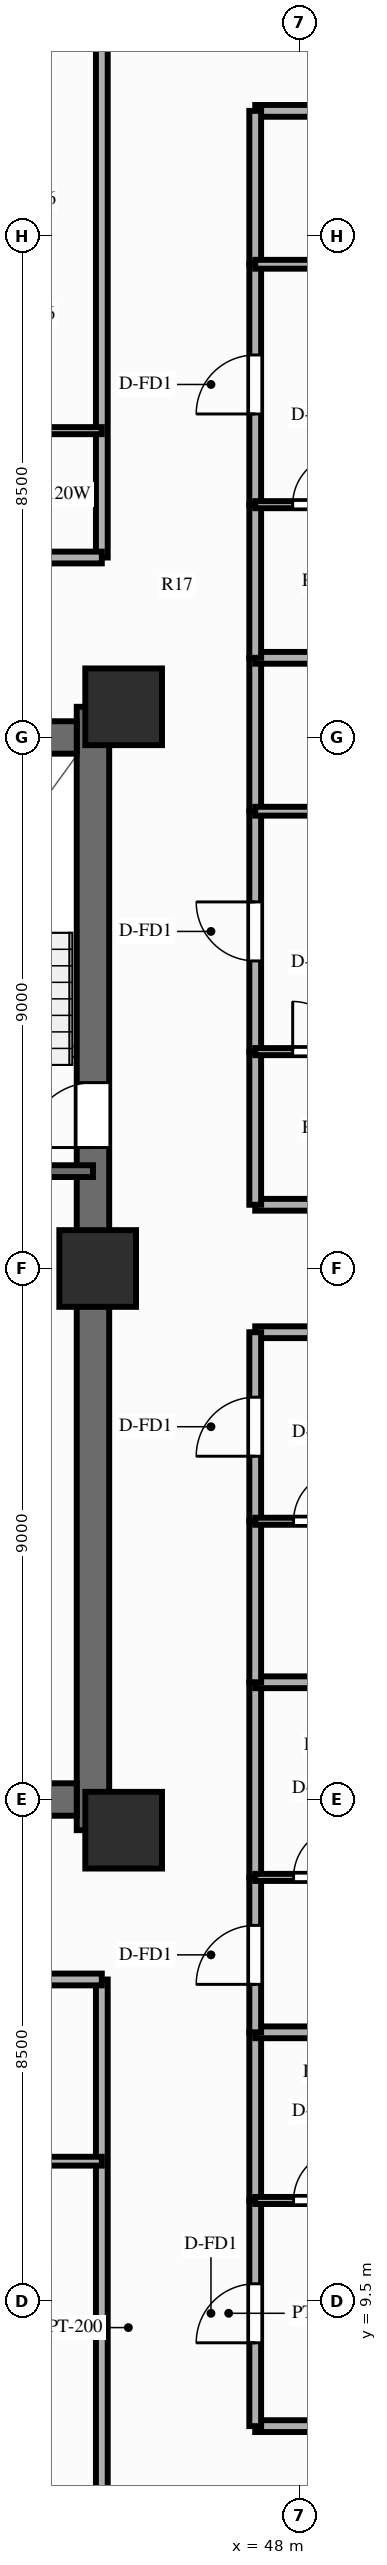
"""IFC4 building model, lengths in metres.
Left out: names, types, materials, properties, quantities, classifications, styles, units other than length and angle.
Written with IfcOpenShell. Run it as: python <this file> out.ifc"""

import sys

from ifc_helpers import new_model, si_unit, direction, frame, frame_2d, origin, origin_2d, place, context, subcontext, project, spatial, rectangle, extrude, source, transform, mapped, element, fill, save


model = new_model("IFC4")
c1 = context("Model", 3, precision=1e-05, world=origin(), true_north=direction((0.0, 1.0)))
c2 = subcontext(c1, "Body", "Model", "MODEL_VIEW")
j1 = project(units=[si_unit("LENGTHUNIT", "METRE"), si_unit("PLANEANGLEUNIT", "RADIAN")], contexts=[c1])
p1 = place(None, origin())
s1 = spatial("IfcSite", under=j1, at=p1, CompositionType="ELEMENT")
p2 = place(p1, origin())
s2 = spatial("IfcBuilding", under=s1, at=p2, CompositionType="ELEMENT")
p3 = place(p2, frame((0.0, 0.0, 116.85)))
s3 = spatial("IfcBuildingStorey", under=s2, at=p3, CompositionType="ELEMENT", Elevation=116.85)
p4 = place(p3, frame((44.5, 17.48, 0.0), z_axis=(0.0, 0.0, 1.0), x_axis=(0.0, 1.0, 0.0)))
e1 = element("IfcWall", 1, at=p4, inside=s3, PredefinedType="SHEAR", context=c2, shape_type="SweptSolid", body=[
    extrude(rectangle(XDim=19.04, YDim=0.55, at=frame_2d((9.52, 0.0))), origin(), (0.0, 0.0, 1.0), 3.0),
])
p5 = place(p4, frame((12.67, 0.0, 0.0), z_axis=(0.0, 0.0, 1.0), x_axis=(-1.0, 0.0, 0.0)))
e2 = element("IfcOpeningElement", 2, at=p5, cuts=e1, PredefinedType="OPENING", context=c2, shape_type="SweptSolid", body=[
    extrude(rectangle(XDim=1.1, YDim=2.15, at=frame_2d((0.55, 1.075))), frame((0.0, 0.287, 0.0), z_axis=(0.0, -1.0, 0.0), x_axis=(1.0, 0.0, 0.0)), (0.0, 0.0, 1.0), 0.574),
])
p6 = place(p3, frame((31.775, 18.0, 0.0), z_axis=(0.0, 0.0, 1.0), x_axis=(1.0, 0.0, 0.0)))
e3 = element("IfcWall", 3, at=p6, inside=s3, PredefinedType="SHEAR", context=c2, shape_type="SweptSolid", body=[
    extrude(rectangle(XDim=12.45, YDim=0.55, at=frame_2d((6.225, 0.0))), origin(), (0.0, 0.0, 1.0), 3.0),
])
p7 = place(p3, frame((31.775, 36.0, 0.0), z_axis=(0.0, 0.0, 1.0), x_axis=(1.0, 0.0, 0.0)))
e4 = element("IfcWall", 4, at=p7, inside=s3, PredefinedType="SHEAR", context=c2, shape_type="SweptSolid", body=[
    extrude(rectangle(XDim=12.45, YDim=0.55, at=frame_2d((6.225, 0.0))), origin(), (0.0, 0.0, 1.0), 3.0),
])
p8 = place(p7, frame((5.175, 0.0, 0.0), z_axis=(0.0, 0.0, 1.0), x_axis=(-1.0, 0.0, 0.0)))
e5 = element("IfcOpeningElement", 5, at=p8, cuts=e4, PredefinedType="OPENING", context=c2, shape_type="SweptSolid", body=[
    extrude(rectangle(XDim=1.4, YDim=2.15, at=frame_2d((0.7, 1.075))), frame((0.0, 0.287, 0.0), z_axis=(0.0, -1.0, 0.0), x_axis=(1.0, 0.0, 0.0)), (0.0, 0.0, 1.0), 0.574),
])
m1 = source(origin(), c2, "Body", "SweptSolid", [
    extrude(rectangle(XDim=1.3, YDim=1.3, at=origin_2d()), origin(), (0.0, 0.0, 1.0), 3.0),
])
for number, where, z_axis, x_axis in (
    (6, (45.02, 17.48, 0.0), (0.0, 0.0, 1.0), (1.0, 0.0, 0.0)),
    (7, (45.02, 36.52, 0.0), (0.0, 0.0, 1.0), (1.0, 0.0, 0.0)),
    (8, (44.58, 27.0, 0.0), (0.0, 0.0, 1.0), (1.0, 0.0, 0.0)),
):
    element("IfcColumn", number, at=place(p3, frame(where, z_axis=z_axis, x_axis=x_axis)), inside=s3, PredefinedType="COLUMN", context=c2, shape_type="MappedRepresentation", body=[
        mapped(m1, transform((0.0, 0.0, 0.0), scale=1.0)),
    ])
p9 = place(p3, frame((40.57, 28.65, 0.0), z_axis=(0.0, 0.0, 1.0), x_axis=(1.0, 0.0, 0.0)))
e9 = element("IfcWall", 9, at=p9, inside=s3, PredefinedType="SOLIDWALL", context=c2, shape_type="SweptSolid", body=[
    extrude(rectangle(XDim=3.93, YDim=0.2, at=frame_2d((1.965, 0.0))), origin(), (0.0, 0.0, 1.0), 2.79),
])
p10 = place(p3, frame((44.65, 14.95, 0.0), z_axis=(0.0, 0.0, 1.0), x_axis=(0.0, -1.0, 0.0)))
e10 = element("IfcWall", 10, at=p10, inside=s3, PredefinedType="PARTITIONING", context=c2, shape_type="SweptSolid", body=[
    extrude(rectangle(XDim=11.8, YDim=0.2, at=frame_2d((5.9, 0.0))), origin(), (0.0, 0.0, 1.0), 2.34),
])
p11 = place(p3, frame((40.923, 14.95, 0.0), z_axis=(0.0, 0.0, 1.0), x_axis=(1.0, 0.0, 0.0)))
e11 = element("IfcWall", 11, at=p11, inside=s3, PredefinedType="PARTITIONING", context=c2, shape_type="SweptSolid", body=[
    extrude(rectangle(XDim=3.727, YDim=0.2, at=frame_2d((1.864, 0.0))), origin(), (0.0, 0.0, 1.0), 2.79),
])
p12 = place(p3, frame((40.923, 11.87, 0.0), z_axis=(0.0, 0.0, 1.0), x_axis=(1.0, 0.0, 0.0)))
e12 = element("IfcWall", 12, at=p12, inside=s3, PredefinedType="PARTITIONING", context=c2, shape_type="SweptSolid", body=[
    extrude(rectangle(XDim=3.727, YDim=0.15, at=frame_2d((1.864, 0.0))), origin(), (0.0, 0.0, 1.0), 2.79),
])
p13 = place(p3, frame((44.65, 39.05, 0.0), z_axis=(0.0, 0.0, 1.0), x_axis=(0.0, 1.0, 0.0)))
e13 = element("IfcWall", 13, at=p13, inside=s3, PredefinedType="PARTITIONING", context=c2, shape_type="SweptSolid", body=[
    extrude(rectangle(XDim=11.8, YDim=0.2, at=frame_2d((5.9, 0.0))), origin(), (0.0, 0.0, 1.0), 2.34),
])
p14 = place(p3, frame((42.55, 39.05, 0.0), z_axis=(0.0, 0.0, 1.0), x_axis=(1.0, 0.0, 0.0)))
e14 = element("IfcWall", 14, at=p14, inside=s3, PredefinedType="PARTITIONING", context=c2, shape_type="SweptSolid", body=[
    extrude(rectangle(XDim=2.1, YDim=0.2, at=frame_2d((1.05, 0.0))), origin(), (0.0, 0.0, 1.0), 2.79),
])
p15 = place(p3, frame((42.55, 41.2, 0.0), z_axis=(0.0, 0.0, 1.0), x_axis=(1.0, 0.0, 0.0)))
e15 = element("IfcWall", 15, at=p15, inside=s3, PredefinedType="PARTITIONING", context=c2, shape_type="SweptSolid", body=[
    extrude(rectangle(XDim=2.1, YDim=0.12, at=frame_2d((1.05, 0.0))), origin(), (0.0, 0.0, 1.0), 2.79),
])
for number, where, z_axis, x_axis in (
    (16, (47.25, 7.38, 0.0), (0.0, 0.0, 1.0), (1.0, 0.0, 0.0)),
    (17, (47.25, 25.92, 0.0), (0.0, 0.0, 1.0), (1.0, 0.0, 0.0)),
):
    element("IfcWall", number, at=place(p3, frame(where, z_axis=z_axis, x_axis=x_axis)), inside=s3, PredefinedType="PARTITIONING", context=c2, shape_type="SweptSolid", body=[
        extrude(rectangle(XDim=16.6, YDim=0.2, at=frame_2d((8.3, 0.0))), origin(), (0.0, 0.0, 1.0), 2.79),
    ])
p16 = place(p3, frame((47.25, 7.38, 0.0), z_axis=(0.0, 0.0, 1.0), x_axis=(0.0, 1.0, 0.0)))
e18 = element("IfcWall", 18, at=p16, inside=s3, PredefinedType="PARTITIONING", context=c2, shape_type="SweptSolid", body=[
    extrude(rectangle(XDim=3.824, YDim=0.2, at=frame_2d((1.912, 0.0))), origin(), (0.0, 0.0, 1.0), 2.79),
])
p17 = place(p16, frame((1.412, 0.0, 0.0)))
e19 = element("IfcOpeningElement", 19, at=p17, cuts=e18, PredefinedType="OPENING", context=c2, shape_type="SweptSolid", body=[
    extrude(rectangle(XDim=1.0, YDim=2.15, at=frame_2d((0.5, 1.075))), frame((0.0, 0.112, 0.0), z_axis=(0.0, -1.0, 0.0), x_axis=(1.0, 0.0, 0.0)), (0.0, 0.0, 1.0), 0.224),
])
p18 = place(p3, frame((47.25, 11.204, 0.0), z_axis=(0.0, 0.0, 1.0), x_axis=(0.0, 1.0, 0.0)))
e20 = element("IfcWall", 20, at=p18, inside=s3, PredefinedType="PARTITIONING", context=c2, shape_type="SweptSolid", body=[
    extrude(rectangle(XDim=2.85, YDim=0.2, at=frame_2d((1.425, 0.0))), origin(), (0.0, 0.0, 1.0), 2.79),
])
p19 = place(p3, frame((47.25, 11.204, 0.0), z_axis=(0.0, 0.0, 1.0), x_axis=(1.0, 0.0, 0.0)))
e21 = element("IfcWall", 21, at=p19, inside=s3, PredefinedType="PARTITIONING", context=c2, shape_type="SweptSolid", body=[
    extrude(rectangle(XDim=2.15, YDim=0.12, at=frame_2d((1.075, 0.0))), origin(), (0.0, 0.0, 1.0), 2.79),
])
p20 = place(p19, frame((0.65, 0.0, 0.0)))
e22 = element("IfcOpeningElement", 22, at=p20, cuts=e21, PredefinedType="OPENING", context=c2, shape_type="SweptSolid", body=[
    extrude(rectangle(XDim=0.85, YDim=2.05, at=frame_2d((0.425, 1.025))), frame((0.0, 0.072, 0.0), z_axis=(0.0, -1.0, 0.0), x_axis=(1.0, 0.0, 0.0)), (0.0, 0.0, 1.0), 0.144),
])
p21 = place(p3, frame((47.25, 14.054, 0.0), z_axis=(0.0, 0.0, 1.0), x_axis=(1.0, 0.0, 0.0)))
e23 = element("IfcWall", 23, at=p21, inside=s3, PredefinedType="PARTITIONING", context=c2, shape_type="SweptSolid", body=[
    extrude(rectangle(XDim=16.6, YDim=0.2, at=frame_2d((8.3, 0.0))), origin(), (0.0, 0.0, 1.0), 2.79),
])
p22 = place(p3, frame((47.25, 14.054, 0.0), z_axis=(0.0, 0.0, 1.0), x_axis=(0.0, 1.0, 0.0)))
e24 = element("IfcWall", 24, at=p22, inside=s3, PredefinedType="PARTITIONING", context=c2, shape_type="SweptSolid", body=[
    extrude(rectangle(XDim=2.625, YDim=0.2, at=frame_2d((1.313, 0.0))), origin(), (0.0, 0.0, 1.0), 2.79),
])
p23 = place(p22, frame((0.813, 0.0, 0.0)))
e25 = element("IfcOpeningElement", 25, at=p23, cuts=e24, PredefinedType="OPENING", context=c2, shape_type="SweptSolid", body=[
    extrude(rectangle(XDim=1.0, YDim=2.15, at=frame_2d((0.5, 1.075))), frame((0.0, 0.112, 0.0), z_axis=(0.0, -1.0, 0.0), x_axis=(1.0, 0.0, 0.0)), (0.0, 0.0, 1.0), 0.224),
])
p24 = place(p3, frame((47.25, 16.68, 0.0), z_axis=(0.0, 0.0, 1.0), x_axis=(0.0, 1.0, 0.0)))
e26 = element("IfcWall", 26, at=p24, inside=s3, PredefinedType="PARTITIONING", context=c2, shape_type="SweptSolid", body=[
    extrude(rectangle(XDim=3.307, YDim=0.2, at=frame_2d((1.654, 0.0))), origin(), (0.0, 0.0, 1.0), 2.79),
])
p25 = place(p3, frame((47.25, 16.68, 0.0), z_axis=(0.0, 0.0, 1.0), x_axis=(1.0, 0.0, 0.0)))
e27 = element("IfcWall", 27, at=p25, inside=s3, PredefinedType="PARTITIONING", context=c2, shape_type="SweptSolid", body=[
    extrude(rectangle(XDim=2.15, YDim=0.12, at=frame_2d((1.075, 0.0))), origin(), (0.0, 0.0, 1.0), 2.79),
])
p26 = place(p25, frame((0.65, 0.0, 0.0)))
e28 = element("IfcOpeningElement", 28, at=p26, cuts=e27, PredefinedType="OPENING", context=c2, shape_type="SweptSolid", body=[
    extrude(rectangle(XDim=0.85, YDim=2.05, at=frame_2d((0.425, 1.025))), frame((0.0, 0.072, 0.0), z_axis=(0.0, -1.0, 0.0), x_axis=(1.0, 0.0, 0.0)), (0.0, 0.0, 1.0), 0.144),
])
p27 = place(p3, frame((47.25, 19.987, 0.0), z_axis=(0.0, 0.0, 1.0), x_axis=(1.0, 0.0, 0.0)))
e29 = element("IfcWall", 29, at=p27, inside=s3, PredefinedType="PARTITIONING", context=c2, shape_type="SweptSolid", body=[
    extrude(rectangle(XDim=16.6, YDim=0.2, at=frame_2d((8.3, 0.0))), origin(), (0.0, 0.0, 1.0), 2.79),
])
p28 = place(p3, frame((47.25, 19.987, 0.0), z_axis=(0.0, 0.0, 1.0), x_axis=(0.0, 1.0, 0.0)))
e30 = element("IfcWall", 30, at=p28, inside=s3, PredefinedType="PARTITIONING", context=c2, shape_type="SweptSolid", body=[
    extrude(rectangle(XDim=2.729, YDim=0.2, at=frame_2d((1.365, 0.0))), origin(), (0.0, 0.0, 1.0), 2.79),
])
p29 = place(p3, frame((47.25, 22.716, 0.0), z_axis=(0.0, 0.0, 1.0), x_axis=(0.0, 1.0, 0.0)))
e31 = element("IfcWall", 31, at=p29, inside=s3, PredefinedType="PARTITIONING", context=c2, shape_type="SweptSolid", body=[
    extrude(rectangle(XDim=3.204, YDim=0.2, at=frame_2d((1.602, 0.0))), origin(), (0.0, 0.0, 1.0), 2.79),
])
p30 = place(p29, frame((1.102, 0.0, 0.0)))
e32 = element("IfcOpeningElement", 32, at=p30, cuts=e31, PredefinedType="OPENING", context=c2, shape_type="SweptSolid", body=[
    extrude(rectangle(XDim=1.0, YDim=2.15, at=frame_2d((0.5, 1.075))), frame((0.0, 0.112, 0.0), z_axis=(0.0, -1.0, 0.0), x_axis=(1.0, 0.0, 0.0)), (0.0, 0.0, 1.0), 0.224),
])
p31 = place(p3, frame((47.25, 22.716, 0.0), z_axis=(0.0, 0.0, 1.0), x_axis=(1.0, 0.0, 0.0)))
e33 = element("IfcWall", 33, at=p31, inside=s3, PredefinedType="PARTITIONING", context=c2, shape_type="SweptSolid", body=[
    extrude(rectangle(XDim=2.15, YDim=0.12, at=frame_2d((1.075, 0.0))), origin(), (0.0, 0.0, 1.0), 2.79),
])
p32 = place(p31, frame((0.65, 0.0, 0.0)))
e34 = element("IfcOpeningElement", 34, at=p32, cuts=e33, PredefinedType="OPENING", context=c2, shape_type="SweptSolid", body=[
    extrude(rectangle(XDim=0.85, YDim=2.05, at=frame_2d((0.425, 1.025))), frame((0.0, 0.072, 0.0), z_axis=(0.0, -1.0, 0.0), x_axis=(1.0, 0.0, 0.0)), (0.0, 0.0, 1.0), 0.144),
])
for number, where, z_axis, x_axis in (
    (35, (47.25, 28.08, 0.0), (0.0, 0.0, 1.0), (1.0, 0.0, 0.0)),
    (36, (47.25, 46.62, 0.0), (0.0, 0.0, 1.0), (1.0, 0.0, 0.0)),
):
    element("IfcWall", number, at=place(p3, frame(where, z_axis=z_axis, x_axis=x_axis)), inside=s3, PredefinedType="PARTITIONING", context=c2, shape_type="SweptSolid", body=[
        extrude(rectangle(XDim=16.6, YDim=0.2, at=frame_2d((8.3, 0.0))), origin(), (0.0, 0.0, 1.0), 2.79),
    ])
p33 = place(p3, frame((47.25, 28.08, 0.0), z_axis=(0.0, 0.0, 1.0), x_axis=(0.0, 1.0, 0.0)))
e37 = element("IfcWall", 37, at=p33, inside=s3, PredefinedType="PARTITIONING", context=c2, shape_type="SweptSolid", body=[
    extrude(rectangle(XDim=2.595, YDim=0.2, at=frame_2d((1.298, 0.0))), origin(), (0.0, 0.0, 1.0), 2.79),
])
p34 = place(p3, frame((47.25, 30.676, 0.0), z_axis=(0.0, 0.0, 1.0), x_axis=(0.0, 1.0, 0.0)))
e38 = element("IfcWall", 38, at=p34, inside=s3, PredefinedType="PARTITIONING", context=c2, shape_type="SweptSolid", body=[
    extrude(rectangle(XDim=4.074, YDim=0.2, at=frame_2d((2.037, 0.0))), origin(), (0.0, 0.0, 1.0), 2.79),
])
p35 = place(p34, frame((1.537, 0.0, 0.0)))
e39 = element("IfcOpeningElement", 39, at=p35, cuts=e38, PredefinedType="OPENING", context=c2, shape_type="SweptSolid", body=[
    extrude(rectangle(XDim=1.0, YDim=2.15, at=frame_2d((0.5, 1.075))), frame((0.0, 0.112, 0.0), z_axis=(0.0, -1.0, 0.0), x_axis=(1.0, 0.0, 0.0)), (0.0, 0.0, 1.0), 0.224),
])
p36 = place(p3, frame((47.25, 34.75, 0.0), z_axis=(0.0, 0.0, 1.0), x_axis=(0.0, 1.0, 0.0)))
e40 = element("IfcWall", 40, at=p36, inside=s3, PredefinedType="PARTITIONING", context=c2, shape_type="SweptSolid", body=[
    extrude(rectangle(XDim=2.6, YDim=0.2, at=frame_2d((1.3, 0.0))), origin(), (0.0, 0.0, 1.0), 2.79),
])
p37 = place(p3, frame((47.25, 30.676, 0.0), z_axis=(0.0, 0.0, 1.0), x_axis=(1.0, 0.0, 0.0)))
e41 = element("IfcWall", 41, at=p37, inside=s3, PredefinedType="PARTITIONING", context=c2, shape_type="SweptSolid", body=[
    extrude(rectangle(XDim=2.12, YDim=0.12, at=frame_2d((1.06, 0.0))), origin(), (0.0, 0.0, 1.0), 2.79),
])
p38 = place(p37, frame((0.635, 0.0, 0.0)))
e42 = element("IfcOpeningElement", 42, at=p38, cuts=e41, PredefinedType="OPENING", context=c2, shape_type="SweptSolid", body=[
    extrude(rectangle(XDim=0.85, YDim=2.05, at=frame_2d((0.425, 1.025))), frame((0.0, 0.072, 0.0), z_axis=(0.0, -1.0, 0.0), x_axis=(1.0, 0.0, 0.0)), (0.0, 0.0, 1.0), 0.144),
])
p39 = place(p3, frame((47.25, 34.75, 0.0), z_axis=(0.0, 0.0, 1.0), x_axis=(1.0, 0.0, 0.0)))
e43 = element("IfcWall", 43, at=p39, inside=s3, PredefinedType="PARTITIONING", context=c2, shape_type="SweptSolid", body=[
    extrude(rectangle(XDim=3.08, YDim=0.15, at=frame_2d((1.54, 0.0))), origin(), (0.0, 0.0, 1.0), 2.79),
])
p40 = place(p39, frame((1.09, 0.0, 0.0)))
e44 = element("IfcOpeningElement", 44, at=p40, cuts=e43, PredefinedType="OPENING", context=c2, shape_type="SweptSolid", body=[
    extrude(rectangle(XDim=0.9, YDim=2.1, at=frame_2d((0.45, 1.05))), frame((0.0, 0.087, 0.0), z_axis=(0.0, -1.0, 0.0), x_axis=(1.0, 0.0, 0.0)), (0.0, 0.0, 1.0), 0.174),
])
p41 = place(p3, frame((47.25, 37.35, 0.0), z_axis=(0.0, 0.0, 1.0), x_axis=(1.0, 0.0, 0.0)))
e45 = element("IfcWall", 45, at=p41, inside=s3, PredefinedType="PARTITIONING", context=c2, shape_type="SweptSolid", body=[
    extrude(rectangle(XDim=16.6, YDim=0.2, at=frame_2d((8.3, 0.0))), origin(), (0.0, 0.0, 1.0), 2.79),
])
p42 = place(p3, frame((47.25, 37.35, 0.0), z_axis=(0.0, 0.0, 1.0), x_axis=(0.0, 1.0, 0.0)))
e46 = element("IfcWall", 46, at=p42, inside=s3, PredefinedType="PARTITIONING", context=c2, shape_type="SweptSolid", body=[
    extrude(rectangle(XDim=2.595, YDim=0.2, at=frame_2d((1.298, 0.0))), origin(), (0.0, 0.0, 1.0), 2.79),
])
p43 = place(p3, frame((47.25, 39.946, 0.0), z_axis=(0.0, 0.0, 1.0), x_axis=(0.0, 1.0, 0.0)))
e47 = element("IfcWall", 47, at=p43, inside=s3, PredefinedType="PARTITIONING", context=c2, shape_type="SweptSolid", body=[
    extrude(rectangle(XDim=4.074, YDim=0.2, at=frame_2d((2.037, 0.0))), origin(), (0.0, 0.0, 1.0), 2.79),
])
p44 = place(p43, frame((1.537, 0.0, 0.0)))
e48 = element("IfcOpeningElement", 48, at=p44, cuts=e47, PredefinedType="OPENING", context=c2, shape_type="SweptSolid", body=[
    extrude(rectangle(XDim=1.0, YDim=2.15, at=frame_2d((0.5, 1.075))), frame((0.0, 0.112, 0.0), z_axis=(0.0, -1.0, 0.0), x_axis=(1.0, 0.0, 0.0)), (0.0, 0.0, 1.0), 0.224),
])
p45 = place(p3, frame((47.25, 44.02, 0.0), z_axis=(0.0, 0.0, 1.0), x_axis=(0.0, 1.0, 0.0)))
e49 = element("IfcWall", 49, at=p45, inside=s3, PredefinedType="PARTITIONING", context=c2, shape_type="SweptSolid", body=[
    extrude(rectangle(XDim=2.6, YDim=0.2, at=frame_2d((1.3, 0.0))), origin(), (0.0, 0.0, 1.0), 2.79),
])
p46 = place(p3, frame((47.25, 39.946, 0.0), z_axis=(0.0, 0.0, 1.0), x_axis=(1.0, 0.0, 0.0)))
e50 = element("IfcWall", 50, at=p46, inside=s3, PredefinedType="PARTITIONING", context=c2, shape_type="SweptSolid", body=[
    extrude(rectangle(XDim=2.12, YDim=0.12, at=frame_2d((1.06, 0.0))), origin(), (0.0, 0.0, 1.0), 2.79),
])
p47 = place(p46, frame((0.635, 0.0, 0.0)))
e51 = element("IfcOpeningElement", 51, at=p47, cuts=e50, PredefinedType="OPENING", context=c2, shape_type="SweptSolid", body=[
    extrude(rectangle(XDim=0.85, YDim=2.05, at=frame_2d((0.425, 1.025))), frame((0.0, 0.072, 0.0), z_axis=(0.0, -1.0, 0.0), x_axis=(1.0, 0.0, 0.0)), (0.0, 0.0, 1.0), 0.144),
])
p48 = place(p3, frame((47.25, 44.02, 0.0), z_axis=(0.0, 0.0, 1.0), x_axis=(1.0, 0.0, 0.0)))
e52 = element("IfcWall", 52, at=p48, inside=s3, PredefinedType="PARTITIONING", context=c2, shape_type="SweptSolid", body=[
    extrude(rectangle(XDim=3.08, YDim=0.15, at=frame_2d((1.54, 0.0))), origin(), (0.0, 0.0, 1.0), 2.79),
])
p49 = place(p48, frame((1.09, 0.0, 0.0)))
e53 = element("IfcOpeningElement", 53, at=p49, cuts=e52, PredefinedType="OPENING", context=c2, shape_type="SweptSolid", body=[
    extrude(rectangle(XDim=0.9, YDim=2.1, at=frame_2d((0.45, 1.05))), frame((0.0, 0.087, 0.0), z_axis=(0.0, -1.0, 0.0), x_axis=(1.0, 0.0, 0.0)), (0.0, 0.0, 1.0), 0.174),
])
m2 = source(origin(), c2, "Body", "SweptSolid", [
    extrude(rectangle(XDim=1.1, YDim=2.15, at=frame_2d((0.55, 1.075))), frame((0.0, 0.025, 0.0), z_axis=(0.0, -1.0, 0.0), x_axis=(1.0, 0.0, 0.0)), (0.0, 0.0, 1.0), 0.05),
])
p50 = place(p5, origin())
e54 = element("IfcDoor", 54, at=p50, inside=s3, OperationType="SINGLE_SWING_RIGHT", PredefinedType="DOOR", context=c2, shape_type="MappedRepresentation", body=[
    mapped(m2, transform((0.0, 0.0, 0.0), scale=1.0)),
])
fill(e2, e54)
m3 = source(origin(), c2, "Body", "SweptSolid", [
    extrude(rectangle(XDim=1.0, YDim=2.15, at=frame_2d((0.5, 1.075))), frame((0.0, 0.025, 0.0), z_axis=(0.0, -1.0, 0.0), x_axis=(1.0, 0.0, 0.0)), (0.0, 0.0, 1.0), 0.05),
])
p51 = place(p17, origin())
e55 = element("IfcDoor", 55, at=p51, inside=s3, OperationType="SINGLE_SWING_LEFT", PredefinedType="DOOR", context=c2, shape_type="MappedRepresentation", body=[
    mapped(m3, transform((0.0, 0.0, 0.0), scale=1.0)),
])
fill(e19, e55)
m4 = source(origin(), c2, "Body", "SweptSolid", [
    extrude(rectangle(XDim=0.85, YDim=2.05, at=frame_2d((0.425, 1.025))), frame((0.0, 0.025, 0.0), z_axis=(0.0, -1.0, 0.0), x_axis=(1.0, 0.0, 0.0)), (0.0, 0.0, 1.0), 0.05),
])
p52 = place(p20, origin())
e56 = element("IfcDoor", 56, at=p52, inside=s3, OperationType="SINGLE_SWING_RIGHT", PredefinedType="DOOR", context=c2, shape_type="MappedRepresentation", body=[
    mapped(m4, transform((0.0, 0.0, 0.0), scale=1.0)),
])
fill(e22, e56)
p53 = place(p23, origin())
e57 = element("IfcDoor", 57, at=p53, inside=s3, OperationType="SINGLE_SWING_LEFT", PredefinedType="DOOR", context=c2, shape_type="MappedRepresentation", body=[
    mapped(m3, transform((0.0, 0.0, 0.0), scale=1.0)),
])
fill(e25, e57)
p54 = place(p26, origin())
e58 = element("IfcDoor", 58, at=p54, inside=s3, OperationType="SINGLE_SWING_RIGHT", PredefinedType="DOOR", context=c2, shape_type="MappedRepresentation", body=[
    mapped(m4, transform((0.0, 0.0, 0.0), scale=1.0)),
])
fill(e28, e58)
p55 = place(p30, origin())
e59 = element("IfcDoor", 59, at=p55, inside=s3, OperationType="SINGLE_SWING_LEFT", PredefinedType="DOOR", context=c2, shape_type="MappedRepresentation", body=[
    mapped(m3, transform((0.0, 0.0, 0.0), scale=1.0)),
])
fill(e32, e59)
p56 = place(p32, origin())
e60 = element("IfcDoor", 60, at=p56, inside=s3, OperationType="SINGLE_SWING_RIGHT", PredefinedType="DOOR", context=c2, shape_type="MappedRepresentation", body=[
    mapped(m4, transform((0.0, 0.0, 0.0), scale=1.0)),
])
fill(e34, e60)
p57 = place(p35, origin())
e61 = element("IfcDoor", 61, at=p57, inside=s3, OperationType="SINGLE_SWING_RIGHT", PredefinedType="DOOR", context=c2, shape_type="MappedRepresentation", body=[
    mapped(m3, transform((0.0, 0.0, 0.0), scale=1.0)),
])
fill(e39, e61)
p58 = place(p38, origin())
e62 = element("IfcDoor", 62, at=p58, inside=s3, OperationType="SINGLE_SWING_LEFT", PredefinedType="DOOR", context=c2, shape_type="MappedRepresentation", body=[
    mapped(m4, transform((0.0, 0.0, 0.0), scale=1.0)),
])
fill(e42, e62)
p59 = place(p44, origin())
e63 = element("IfcDoor", 63, at=p59, inside=s3, OperationType="SINGLE_SWING_LEFT", PredefinedType="DOOR", context=c2, shape_type="MappedRepresentation", body=[
    mapped(m3, transform((0.0, 0.0, 0.0), scale=1.0)),
])
fill(e48, e63)
p60 = place(p47, origin())
e64 = element("IfcDoor", 64, at=p60, inside=s3, OperationType="SINGLE_SWING_RIGHT", PredefinedType="DOOR", context=c2, shape_type="MappedRepresentation", body=[
    mapped(m4, transform((0.0, 0.0, 0.0), scale=1.0)),
])
fill(e51, e64)
save(model, sys.argv[1])
